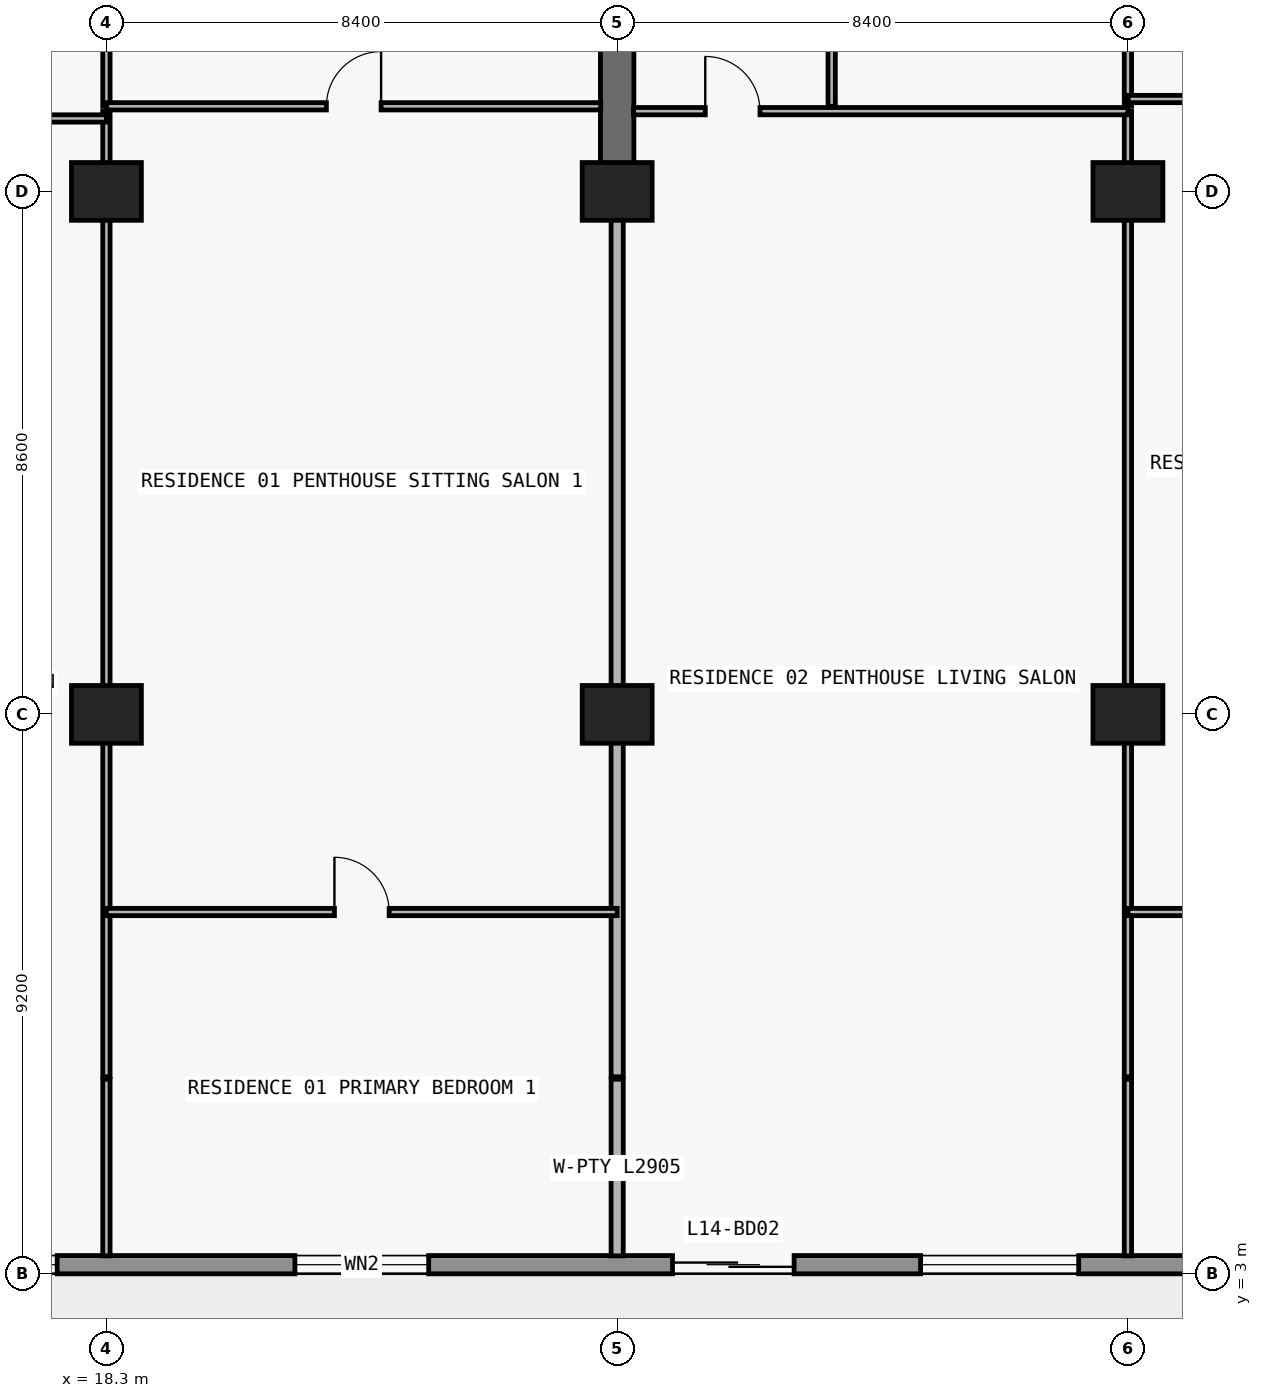
"""IFC4 building model, lengths in metres.
Left out: names, types, materials, properties, quantities, classifications, styles, units other than length and angle.
Written with IfcOpenShell. Run it as: python <this file> out.ifc"""

import sys

from ifc_helpers import new_model, si_unit, direction, frame, frame_2d, origin, origin_2d, place, context, subcontext, project, spatial, rectangle, extrude, element, fill, save


model = new_model("IFC4")
c1 = context("Model", 3, precision=1e-05, world=origin(), true_north=direction((0.0, 1.0)))
c2 = subcontext(c1, "Body", "Model", "MODEL_VIEW")
j1 = project(units=[si_unit("LENGTHUNIT", "METRE"), si_unit("PLANEANGLEUNIT", "RADIAN")], contexts=[c1])
p1 = place(None, origin())
s1 = spatial("IfcSite", under=j1, at=p1, CompositionType="ELEMENT")
p2 = place(p1, origin())
s2 = spatial("IfcBuilding", under=s1, at=p2, CompositionType="ELEMENT")
p3 = place(p2, frame((0.0, 0.0, 56.4)))
s3 = spatial("IfcBuildingStorey", under=s2, at=p3, CompositionType="ELEMENT", Elevation=56.4)
for number, where, z_axis, x_axis in (
    (1, (18.3, 12.2, 0.0), (0.0, 0.0, 1.0), (1.0, 0.0, 0.0)),
    (2, (26.7, 12.2, 0.0), (0.0, 0.0, 1.0), (1.0, 0.0, 0.0)),
    (3, (35.1, 12.2, 0.0), (0.0, 0.0, 1.0), (1.0, 0.0, 0.0)),
    (4, (18.3, 20.8, 0.0), (0.0, 0.0, 1.0), (1.0, 0.0, 0.0)),
    (5, (26.7, 20.8, 0.0), (0.0, 0.0, 1.0), (1.0, 0.0, 0.0)),
    (6, (35.1, 20.8, 0.0), (0.0, 0.0, 1.0), (1.0, 0.0, 0.0)),
):
    element("IfcColumn", number, at=place(p3, frame(where, z_axis=z_axis, x_axis=x_axis)), inside=s3, PredefinedType="COLUMN", context=c2, shape_type="SweptSolid", body=[
        extrude(rectangle(XDim=1.15, YDim=0.95, at=origin_2d()), origin(), (0.0, 0.0, 1.0), 3.05),
    ])
p4 = place(p3, frame((26.7, 20.8, 0.0), z_axis=(0.0, 0.0, 1.0), x_axis=(0.0, 1.0, 0.0)))
e7 = element("IfcWall", 7, at=p4, inside=s3, PredefinedType="SHEAR", context=c2, shape_type="SweptSolid", body=[
    extrude(rectangle(XDim=8.6, YDim=0.55, at=frame_2d((4.3, 0.0))), origin(), (0.0, 0.0, 1.0), 3.05),
])
p5 = place(p3, frame((72.7, 3.15, 0.0), z_axis=(0.0, 0.0, 1.0), x_axis=(-1.0, 0.0, 0.0)))
e8 = element("IfcWall", 8, at=p5, inside=s3, PredefinedType="STANDARD", context=c2, shape_type="SweptSolid", body=[
    extrude(rectangle(XDim=67.6, YDim=0.3, at=frame_2d((33.8, 0.0))), origin(), (0.0, 0.0, 1.0), 3.05),
])
p6 = place(p5, frame((59.89, 0.0, 0.0)))
e9 = element("IfcOpeningElement", 9, at=p6, cuts=e8, PredefinedType="OPENING", context=c2, shape_type="SweptSolid", body=[
    extrude(rectangle(XDim=2.0, YDim=2.3, at=frame_2d((1.0, 1.15))), frame((0.0, 0.16, 0.0), z_axis=(0.0, -1.0, 0.0), x_axis=(1.0, 0.0, 0.0)), (0.0, 0.0, 1.0), 0.32),
])
p7 = place(p5, frame((55.21, 0.0, 0.65)))
e10 = element("IfcOpeningElement", 10, at=p7, cuts=e8, PredefinedType="OPENING", context=c2, shape_type="SweptSolid", body=[
    extrude(rectangle(XDim=2.6, YDim=1.85, at=frame_2d((1.3, 0.925))), frame((0.0, 0.16, 0.0), z_axis=(0.0, -1.0, 0.0), x_axis=(1.0, 0.0, 0.0)), (0.0, 0.0, 1.0), 0.32),
])
p8 = place(p5, frame((49.1, 0.0, 0.85)))
e11 = element("IfcOpeningElement", 11, at=p8, cuts=e8, PredefinedType="OPENING", context=c2, shape_type="SweptSolid", body=[
    extrude(rectangle(XDim=2.2, YDim=1.55, at=frame_2d((1.1, 0.775))), frame((0.0, 0.16, 0.0), z_axis=(0.0, -1.0, 0.0), x_axis=(1.0, 0.0, 0.0)), (0.0, 0.0, 1.0), 0.32),
])
p9 = place(p5, frame((43.09, 0.0, 0.0)))
e12 = element("IfcOpeningElement", 12, at=p9, cuts=e8, PredefinedType="OPENING", context=c2, shape_type="SweptSolid", body=[
    extrude(rectangle(XDim=2.0, YDim=2.3, at=frame_2d((1.0, 1.15))), frame((0.0, 0.16, 0.0), z_axis=(0.0, -1.0, 0.0), x_axis=(1.0, 0.0, 0.0)), (0.0, 0.0, 1.0), 0.32),
])
p10 = place(p5, frame((38.41, 0.0, 0.65)))
e13 = element("IfcOpeningElement", 13, at=p10, cuts=e8, PredefinedType="OPENING", context=c2, shape_type="SweptSolid", body=[
    extrude(rectangle(XDim=2.6, YDim=1.85, at=frame_2d((1.3, 0.925))), frame((0.0, 0.16, 0.0), z_axis=(0.0, -1.0, 0.0), x_axis=(1.0, 0.0, 0.0)), (0.0, 0.0, 1.0), 0.32),
])
p11 = place(p5, frame((32.7, 0.0, 0.85)))
e14 = element("IfcOpeningElement", 14, at=p11, cuts=e8, PredefinedType="OPENING", context=c2, shape_type="SweptSolid", body=[
    extrude(rectangle(XDim=2.2, YDim=1.55, at=frame_2d((1.1, 0.775))), frame((0.0, 0.16, 0.0), z_axis=(0.0, -1.0, 0.0), x_axis=(1.0, 0.0, 0.0)), (0.0, 0.0, 1.0), 0.32),
])
p12 = place(p5, frame((27.026, 0.0, 0.0)))
e15 = element("IfcOpeningElement", 15, at=p12, cuts=e8, PredefinedType="OPENING", context=c2, shape_type="SweptSolid", body=[
    extrude(rectangle(XDim=2.0, YDim=2.3, at=frame_2d((1.0, 1.15))), frame((0.0, 0.16, 0.0), z_axis=(0.0, -1.0, 0.0), x_axis=(1.0, 0.0, 0.0)), (0.0, 0.0, 1.0), 0.32),
])
p13 = place(p5, frame((22.726, 0.0, 0.85)))
e16 = element("IfcOpeningElement", 16, at=p13, cuts=e8, PredefinedType="OPENING", context=c2, shape_type="SweptSolid", body=[
    extrude(rectangle(XDim=2.2, YDim=1.55, at=frame_2d((1.1, 0.775))), frame((0.0, 0.16, 0.0), z_axis=(0.0, -1.0, 0.0), x_axis=(1.0, 0.0, 0.0)), (0.0, 0.0, 1.0), 0.32),
])
p14 = place(p5, frame((18.29, 0.0, 0.0)))
e17 = element("IfcOpeningElement", 17, at=p14, cuts=e8, PredefinedType="OPENING", context=c2, shape_type="SweptSolid", body=[
    extrude(rectangle(XDim=2.0, YDim=2.3, at=frame_2d((1.0, 1.15))), frame((0.0, 0.16, 0.0), z_axis=(0.0, -1.0, 0.0), x_axis=(1.0, 0.0, 0.0)), (0.0, 0.0, 1.0), 0.32),
])
p15 = place(p5, frame((14.19, 0.0, 0.85)))
e18 = element("IfcOpeningElement", 18, at=p15, cuts=e8, PredefinedType="OPENING", context=c2, shape_type="SweptSolid", body=[
    extrude(rectangle(XDim=1.8, YDim=1.55, at=frame_2d((0.9, 0.775))), frame((0.0, 0.16, 0.0), z_axis=(0.0, -1.0, 0.0), x_axis=(1.0, 0.0, 0.0)), (0.0, 0.0, 1.0), 0.32),
])
p16 = place(p5, frame((10.226, 0.0, 0.0)))
e19 = element("IfcOpeningElement", 19, at=p16, cuts=e8, PredefinedType="OPENING", context=c2, shape_type="SweptSolid", body=[
    extrude(rectangle(XDim=2.0, YDim=2.3, at=frame_2d((1.0, 1.15))), frame((0.0, 0.16, 0.0), z_axis=(0.0, -1.0, 0.0), x_axis=(1.0, 0.0, 0.0)), (0.0, 0.0, 1.0), 0.32),
])
p17 = place(p5, frame((5.926, 0.0, 0.85)))
e20 = element("IfcOpeningElement", 20, at=p17, cuts=e8, PredefinedType="OPENING", context=c2, shape_type="SweptSolid", body=[
    extrude(rectangle(XDim=2.2, YDim=1.55, at=frame_2d((1.1, 0.775))), frame((0.0, 0.16, 0.0), z_axis=(0.0, -1.0, 0.0), x_axis=(1.0, 0.0, 0.0)), (0.0, 0.0, 1.0), 0.32),
])
p18 = place(p3, frame((18.3, 3.295, 0.0), z_axis=(0.0, 0.0, 1.0), x_axis=(0.0, 1.0, 0.0)))
e21 = element("IfcWall", 21, at=p18, inside=s3, PredefinedType="PARTITIONING", context=c2, shape_type="SweptSolid", body=[
    extrude(rectangle(XDim=2.905, YDim=0.12, at=frame_2d((1.453, 0.0))), origin(), (0.0, 0.0, 1.0), 3.05),
])
p19 = place(p3, frame((18.3, 6.24, 0.0), z_axis=(0.0, 0.0, 1.0), x_axis=(0.0, 1.0, 0.0)))
e22 = element("IfcWall", 22, at=p19, inside=s3, PredefinedType="PARTITIONING", context=c2, shape_type="SweptSolid", body=[
    extrude(rectangle(XDim=15.88, YDim=0.12, at=frame_2d((7.94, 0.0))), origin(), (0.0, 0.0, 1.0), 2.11),
])
p20 = place(p3, frame((18.3, 22.2, 0.0), z_axis=(0.0, 0.0, 1.0), x_axis=(0.0, 1.0, 0.0)))
e23 = element("IfcWall", 23, at=p20, inside=s3, PredefinedType="PARTITIONING", context=c2, shape_type="SweptSolid", body=[
    extrude(rectangle(XDim=4.38, YDim=0.12, at=frame_2d((2.19, 0.0))), origin(), (0.0, 0.0, 1.0), 2.11),
])
p21 = place(p20, frame((1.74, 0.0, 0.0)))
e24 = element("IfcOpeningElement", 24, at=p21, cuts=e23, PredefinedType="OPENING", context=c2, shape_type="SweptSolid", body=[
    extrude(rectangle(XDim=0.9, YDim=2.06, at=frame_2d((0.45, 1.03))), frame((0.0, 0.07, 0.0), z_axis=(0.0, -1.0, 0.0), x_axis=(1.0, 0.0, 0.0)), (0.0, 0.0, 1.0), 0.14),
])
p22 = place(p3, frame((26.7, 3.295, 0.0), z_axis=(0.0, 0.0, 1.0), x_axis=(0.0, 1.0, 0.0)))
e25 = element("IfcWall", 25, at=p22, inside=s3, PredefinedType="PARTITIONING", context=c2, shape_type="SweptSolid", body=[
    extrude(rectangle(XDim=2.905, YDim=0.2, at=frame_2d((1.453, 0.0))), origin(), (0.0, 0.0, 1.0), 3.05),
])
p23 = place(p3, frame((26.7, 6.24, 0.0), z_axis=(0.0, 0.0, 1.0), x_axis=(0.0, 1.0, 0.0)))
e26 = element("IfcWall", 26, at=p23, inside=s3, PredefinedType="PARTITIONING", context=c2, shape_type="SweptSolid", body=[
    extrude(rectangle(XDim=14.555, YDim=0.2, at=frame_2d((7.277, 0.0))), origin(), (0.0, 0.0, 1.0), 2.11),
])
p24 = place(p3, frame((30.228, 22.2, 0.0), z_axis=(0.0, 0.0, 1.0), x_axis=(0.0, 1.0, 0.0)))
e27 = element("IfcWall", 27, at=p24, inside=s3, PredefinedType="PARTITIONING", context=c2, shape_type="SweptSolid", body=[
    extrude(rectangle(XDim=4.38, YDim=0.12, at=frame_2d((2.19, 0.0))), origin(), (0.0, 0.0, 1.0), 3.05),
])
p25 = place(p24, frame((1.74, 0.0, 0.0)))
e28 = element("IfcOpeningElement", 28, at=p25, cuts=e27, PredefinedType="OPENING", context=c2, shape_type="SweptSolid", body=[
    extrude(rectangle(XDim=0.9, YDim=2.15, at=frame_2d((0.45, 1.075))), frame((0.0, 0.07, 0.0), z_axis=(0.0, -1.0, 0.0), x_axis=(1.0, 0.0, 0.0)), (0.0, 0.0, 1.0), 0.14),
])
p26 = place(p3, frame((35.1, 3.295, 0.0), z_axis=(0.0, 0.0, 1.0), x_axis=(0.0, 1.0, 0.0)))
e29 = element("IfcWall", 29, at=p26, inside=s3, PredefinedType="PARTITIONING", context=c2, shape_type="SweptSolid", body=[
    extrude(rectangle(XDim=2.905, YDim=0.12, at=frame_2d((1.453, 0.0))), origin(), (0.0, 0.0, 1.0), 3.05),
])
p27 = place(p3, frame((35.1, 6.24, 0.0), z_axis=(0.0, 0.0, 1.0), x_axis=(0.0, 1.0, 0.0)))
e30 = element("IfcWall", 30, at=p27, inside=s3, PredefinedType="PARTITIONING", context=c2, shape_type="SweptSolid", body=[
    extrude(rectangle(XDim=15.88, YDim=0.12, at=frame_2d((7.94, 0.0))), origin(), (0.0, 0.0, 1.0), 2.11),
])
p28 = place(p3, frame((35.1, 22.2, 0.0), z_axis=(0.0, 0.0, 1.0), x_axis=(0.0, 1.0, 0.0)))
e31 = element("IfcWall", 31, at=p28, inside=s3, PredefinedType="PARTITIONING", context=c2, shape_type="SweptSolid", body=[
    extrude(rectangle(XDim=4.38, YDim=0.12, at=frame_2d((2.19, 0.0))), origin(), (0.0, 0.0, 1.0), 2.11),
])
p29 = place(p28, frame((1.8, 0.0, 0.0)))
e32 = element("IfcOpeningElement", 32, at=p29, cuts=e31, PredefinedType="OPENING", context=c2, shape_type="SweptSolid", body=[
    extrude(rectangle(XDim=0.9, YDim=2.06, at=frame_2d((0.45, 1.03))), frame((0.0, 0.07, 0.0), z_axis=(0.0, -1.0, 0.0), x_axis=(1.0, 0.0, 0.0)), (0.0, 0.0, 1.0), 0.14),
])
p30 = place(p3, frame((18.3, 8.95, 0.0), z_axis=(0.0, 0.0, 1.0), x_axis=(1.0, 0.0, 0.0)))
e33 = element("IfcWall", 33, at=p30, inside=s3, PredefinedType="PARTITIONING", context=c2, shape_type="SweptSolid", body=[
    extrude(rectangle(XDim=8.4, YDim=0.12, at=frame_2d((4.2, 0.0))), origin(), (0.0, 0.0, 1.0), 3.05),
])
p31 = place(p30, frame((3.75, 0.0, 0.0)))
e34 = element("IfcOpeningElement", 34, at=p31, cuts=e33, PredefinedType="OPENING", context=c2, shape_type="SweptSolid", body=[
    extrude(rectangle(XDim=0.9, YDim=2.15, at=frame_2d((0.45, 1.075))), frame((0.0, 0.07, 0.0), z_axis=(0.0, -1.0, 0.0), x_axis=(1.0, 0.0, 0.0)), (0.0, 0.0, 1.0), 0.14),
])
p32 = place(p3, frame((35.1, 8.95, 0.0), z_axis=(0.0, 0.0, 1.0), x_axis=(1.0, 0.0, 0.0)))
e35 = element("IfcWall", 35, at=p32, inside=s3, PredefinedType="PARTITIONING", context=c2, shape_type="SweptSolid", body=[
    extrude(rectangle(XDim=7.6, YDim=0.12, at=frame_2d((3.8, 0.0))), origin(), (0.0, 0.0, 1.0), 3.05),
])
p33 = place(p32, frame((3.35, 0.0, 0.0)))
e36 = element("IfcOpeningElement", 36, at=p33, cuts=e35, PredefinedType="OPENING", context=c2, shape_type="SweptSolid", body=[
    extrude(rectangle(XDim=0.9, YDim=2.15, at=frame_2d((0.45, 1.075))), frame((0.0, 0.07, 0.0), z_axis=(0.0, -1.0, 0.0), x_axis=(1.0, 0.0, 0.0)), (0.0, 0.0, 1.0), 0.14),
])
p34 = place(p3, frame((9.9, 22.0, 0.0), z_axis=(0.0, 0.0, 1.0), x_axis=(1.0, 0.0, 0.0)))
e37 = element("IfcWall", 37, at=p34, inside=s3, PredefinedType="PARTITIONING", context=c2, shape_type="SweptSolid", body=[
    extrude(rectangle(XDim=8.4, YDim=0.12, at=frame_2d((4.2, 0.0))), origin(), (0.0, 0.0, 1.0), 3.05),
])
p35 = place(p34, frame((1.44, 0.0, 0.0)))
e38 = element("IfcOpeningElement", 38, at=p35, cuts=e37, PredefinedType="OPENING", context=c2, shape_type="SweptSolid", body=[
    extrude(rectangle(XDim=0.9, YDim=2.15, at=frame_2d((0.45, 1.075))), frame((0.0, 0.07, 0.0), z_axis=(0.0, -1.0, 0.0), x_axis=(1.0, 0.0, 0.0)), (0.0, 0.0, 1.0), 0.14),
])
p36 = place(p3, frame((26.97, 22.12, 0.0), z_axis=(0.0, 0.0, 1.0), x_axis=(1.0, 0.0, 0.0)))
e39 = element("IfcWall", 39, at=p36, inside=s3, PredefinedType="PARTITIONING", context=c2, shape_type="SweptSolid", body=[
    extrude(rectangle(XDim=8.13, YDim=0.12, at=frame_2d((4.065, 0.0))), origin(), (0.0, 0.0, 1.0), 3.05),
])
p37 = place(p36, frame((1.179, 0.0, 0.0)))
e40 = element("IfcOpeningElement", 40, at=p37, cuts=e39, PredefinedType="OPENING", context=c2, shape_type="SweptSolid", body=[
    extrude(rectangle(XDim=0.9, YDim=2.15, at=frame_2d((0.45, 1.075))), frame((0.0, 0.07, 0.0), z_axis=(0.0, -1.0, 0.0), x_axis=(1.0, 0.0, 0.0)), (0.0, 0.0, 1.0), 0.14),
])
p38 = place(p3, frame((18.305, 22.2, 0.0), z_axis=(0.0, 0.0, 1.0), x_axis=(1.0, 0.0, 0.0)))
e41 = element("IfcWall", 41, at=p38, inside=s3, PredefinedType="PARTITIONING", context=c2, shape_type="SweptSolid", body=[
    extrude(rectangle(XDim=8.125, YDim=0.12, at=frame_2d((4.062, 0.0))), origin(), (0.0, 0.0, 1.0), 3.05),
])
p39 = place(p38, frame((3.613, 0.0, 0.0)))
e42 = element("IfcOpeningElement", 42, at=p39, cuts=e41, PredefinedType="OPENING", context=c2, shape_type="SweptSolid", body=[
    extrude(rectangle(XDim=0.9, YDim=2.15, at=frame_2d((0.45, 1.075))), frame((0.0, 0.07, 0.0), z_axis=(0.0, -1.0, 0.0), x_axis=(1.0, 0.0, 0.0)), (0.0, 0.0, 1.0), 0.14),
])
p40 = place(p3, frame((35.105, 22.32, 0.0), z_axis=(0.0, 0.0, 1.0), x_axis=(1.0, 0.0, 0.0)))
e43 = element("IfcWall", 43, at=p40, inside=s3, PredefinedType="PARTITIONING", context=c2, shape_type="SweptSolid", body=[
    extrude(rectangle(XDim=7.595, YDim=0.12, at=frame_2d((3.797, 0.0))), origin(), (0.0, 0.0, 1.0), 3.05),
])
p41 = place(p40, frame((3.347, 0.0, 0.0)))
e44 = element("IfcOpeningElement", 44, at=p41, cuts=e43, PredefinedType="OPENING", context=c2, shape_type="SweptSolid", body=[
    extrude(rectangle(XDim=0.9, YDim=2.15, at=frame_2d((0.45, 1.075))), frame((0.0, 0.07, 0.0), z_axis=(0.0, -1.0, 0.0), x_axis=(1.0, 0.0, 0.0)), (0.0, 0.0, 1.0), 0.14),
])
p42 = place(p7, origin())
e45 = element("IfcWindow", 45, at=p42, inside=s3, PartitioningType="SINGLE_PANEL", PredefinedType="WINDOW", context=c2, shape_type="SweptSolid", body=[
    extrude(rectangle(XDim=2.6, YDim=1.85, at=frame_2d((1.3, 0.925))), frame((0.0, 0.03, 0.0), z_axis=(0.0, -1.0, 0.0), x_axis=(1.0, 0.0, 0.0)), (0.0, 0.0, 1.0), 0.06),
])
fill(e10, e45)
p43 = place(p8, origin())
e46 = element("IfcWindow", 46, at=p43, inside=s3, PartitioningType="SINGLE_PANEL", PredefinedType="WINDOW", context=c2, shape_type="SweptSolid", body=[
    extrude(rectangle(XDim=2.2, YDim=1.55, at=frame_2d((1.1, 0.775))), frame((0.0, 0.03, 0.0), z_axis=(0.0, -1.0, 0.0), x_axis=(1.0, 0.0, 0.0)), (0.0, 0.0, 1.0), 0.06),
])
fill(e11, e46)
p44 = place(p9, origin())
e47 = element("IfcDoor", 47, at=p44, inside=s3, OperationType="DOUBLE_DOOR_SLIDING", PredefinedType="DOOR", context=c2, shape_type="SweptSolid", body=[
    extrude(rectangle(XDim=2.0, YDim=2.3, at=frame_2d((1.0, 1.15))), frame((0.0, 0.025, 0.0), z_axis=(0.0, -1.0, 0.0), x_axis=(1.0, 0.0, 0.0)), (0.0, 0.0, 1.0), 0.05),
])
fill(e12, e47)
p45 = place(p10, origin())
e48 = element("IfcWindow", 48, at=p45, inside=s3, PartitioningType="SINGLE_PANEL", PredefinedType="WINDOW", context=c2, shape_type="SweptSolid", body=[
    extrude(rectangle(XDim=2.6, YDim=1.85, at=frame_2d((1.3, 0.925))), frame((0.0, 0.03, 0.0), z_axis=(0.0, -1.0, 0.0), x_axis=(1.0, 0.0, 0.0)), (0.0, 0.0, 1.0), 0.06),
])
fill(e13, e48)
p46 = place(p39, origin())
e49 = element("IfcDoor", 49, at=p46, inside=s3, OperationType="SINGLE_SWING_RIGHT", PredefinedType="DOOR", context=c2, shape_type="SweptSolid", body=[
    extrude(rectangle(XDim=0.9, YDim=2.15, at=frame_2d((0.45, 1.075))), frame((0.0, 0.025, 0.0), z_axis=(0.0, -1.0, 0.0), x_axis=(1.0, 0.0, 0.0)), (0.0, 0.0, 1.0), 0.05),
])
fill(e42, e49)
p47 = place(p31, origin())
e50 = element("IfcDoor", 50, at=p47, inside=s3, OperationType="SINGLE_SWING_LEFT", PredefinedType="DOOR", context=c2, shape_type="SweptSolid", body=[
    extrude(rectangle(XDim=0.9, YDim=2.15, at=frame_2d((0.45, 1.075))), frame((0.0, 0.025, 0.0), z_axis=(0.0, -1.0, 0.0), x_axis=(1.0, 0.0, 0.0)), (0.0, 0.0, 1.0), 0.05),
])
fill(e34, e50)
p48 = place(p37, origin())
e51 = element("IfcDoor", 51, at=p48, inside=s3, OperationType="SINGLE_SWING_LEFT", PredefinedType="DOOR", context=c2, shape_type="SweptSolid", body=[
    extrude(rectangle(XDim=0.9, YDim=2.15, at=frame_2d((0.45, 1.075))), frame((0.0, 0.025, 0.0), z_axis=(0.0, -1.0, 0.0), x_axis=(1.0, 0.0, 0.0)), (0.0, 0.0, 1.0), 0.05),
])
fill(e40, e51)
save(model, sys.argv[1])
